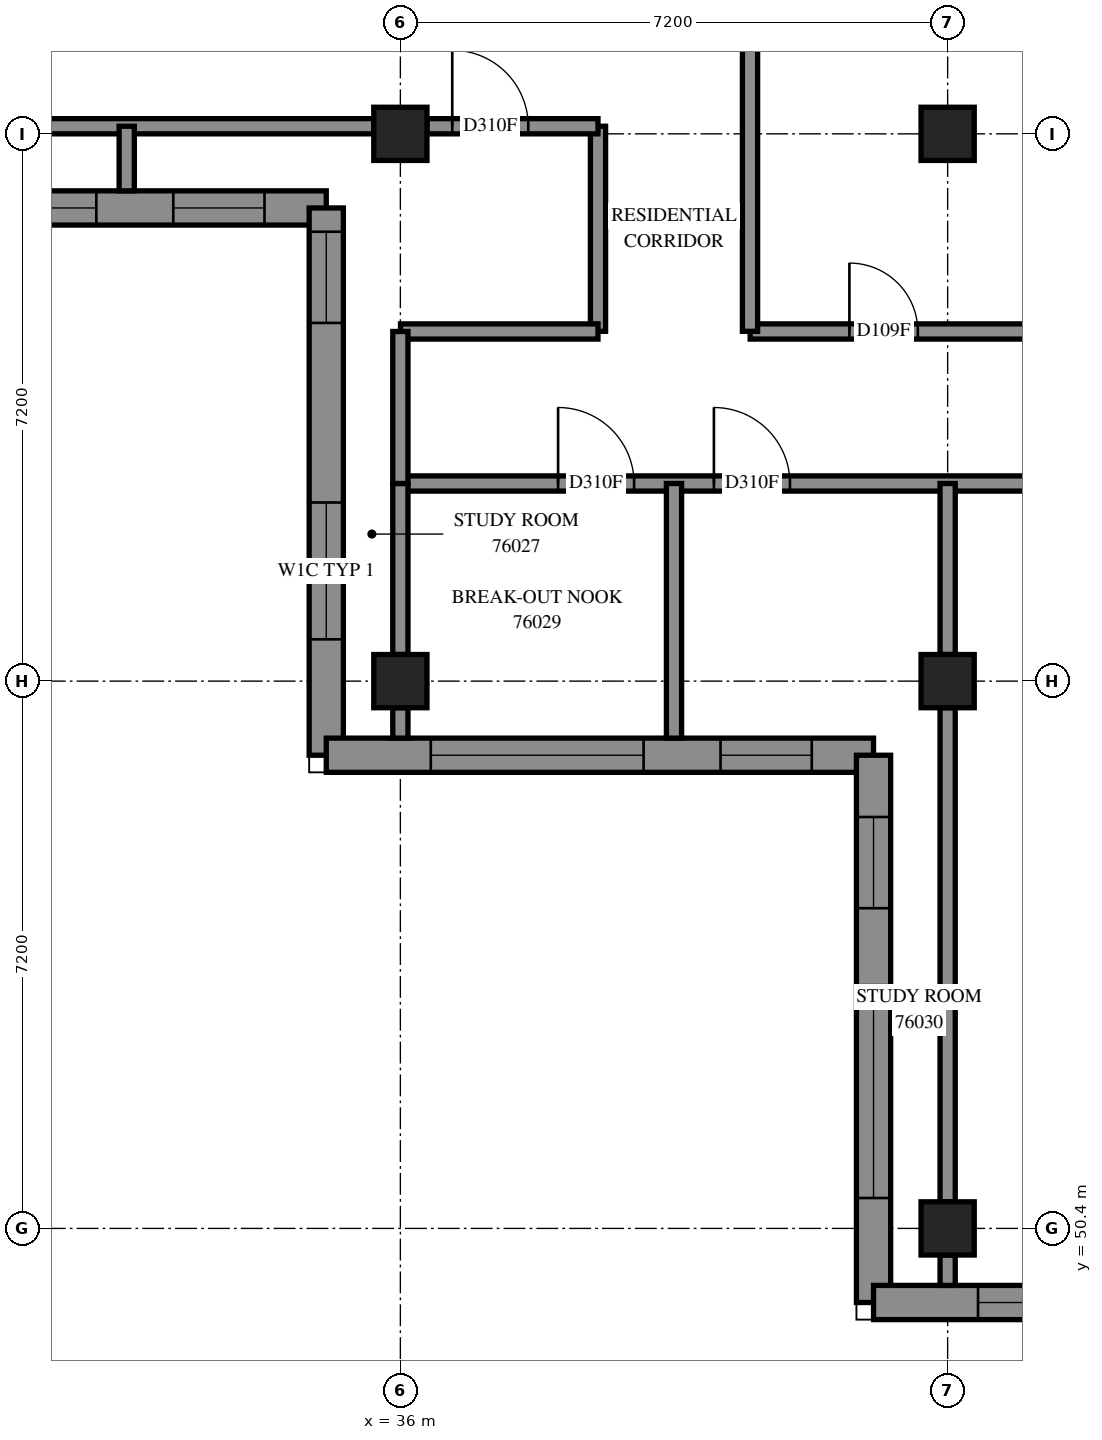
"""IFC4 building model, lengths in metres.
Left out: names, types, materials, properties, quantities, classifications, styles, units other than length and angle.
Written with IfcOpenShell. Run it as: python <this file> out.ifc"""

import sys

from ifc_helpers import new_model, si_unit, direction, frame, frame_2d, origin, origin_2d, place, context, subcontext, project, spatial, polyline, rectangle, outline, extrude, element, fill, save


model = new_model("IFC4")
c1 = context("Model", 3, precision=1e-05, world=origin(), true_north=direction((0.0, 1.0)))
c2 = subcontext(c1, "Body", "Model", "MODEL_VIEW")
j1 = project(units=[si_unit("LENGTHUNIT", "METRE"), si_unit("PLANEANGLEUNIT", "RADIAN")], contexts=[c1])
p1 = place(None, origin())
s1 = spatial("IfcSite", under=j1, at=p1, CompositionType="ELEMENT")
p2 = place(p1, origin())
s2 = spatial("IfcBuilding", under=s1, at=p2, CompositionType="ELEMENT")
p3 = place(p2, frame((0.0, 0.0, 277.8)))
s3 = spatial("IfcBuildingStorey", under=s2, at=p3, CompositionType="ELEMENT", Elevation=277.8)
for number, where, z_axis, x_axis in (
    (1, (36.0, 57.6, 0.0), (0.0, 0.0, 1.0), (1.0, 0.0, 0.0)),
    (2, (36.0, 64.8, 0.0), (0.0, 0.0, 1.0), (1.0, 0.0, 0.0)),
    (3, (43.2, 50.4, 0.0), (0.0, 0.0, 1.0), (1.0, 0.0, 0.0)),
    (4, (43.2, 57.6, 0.0), (0.0, 0.0, 1.0), (1.0, 0.0, 0.0)),
    (5, (43.2, 64.8, 0.0), (0.0, 0.0, 1.0), (1.0, 0.0, 0.0)),
):
    element("IfcColumn", number, at=place(p3, frame(where, z_axis=z_axis, x_axis=x_axis)), inside=s3, PredefinedType="COLUMN", context=c2, shape_type="SweptSolid", body=[
        extrude(rectangle(XDim=0.7, YDim=0.7, at=origin_2d()), origin(), (0.0, 0.0, 1.0), 3.1),
    ])
p4 = place(p3, frame((26.622, 63.825, 0.0), z_axis=(0.0, 0.0, 1.0), x_axis=(1.0, 0.0, 0.0)))
e6 = element("IfcWall", 6, at=p4, inside=s3, PredefinedType="SOLIDWALL", context=c2, shape_type="SweptSolid", body=[
    extrude(outline(polyline([(-0.225, -0.225), (8.178, -0.225), (8.628, 0.225), (0.225, 0.225), (-0.225, -0.225)])), origin(), (0.0, 0.0, 1.0), 3.1),
])
p5 = place(p4, frame((2.578, 0.0, 0.45)))
e7 = element("IfcOpeningElement", 7, at=p5, cuts=e6, PredefinedType="OPENING", context=c2, shape_type="SweptSolid", body=[
    extrude(rectangle(XDim=2.8, YDim=2.55, at=frame_2d((1.4, 1.275))), frame((0.0, 0.235, 0.0), z_axis=(0.0, -1.0, 0.0), x_axis=(1.0, 0.0, 0.0)), (0.0, 0.0, 1.0), 0.47),
])
p6 = place(p4, frame((0.702, 0.0, 0.45)))
e8 = element("IfcOpeningElement", 8, at=p6, cuts=e6, PredefinedType="OPENING", context=c2, shape_type="SweptSolid", body=[
    extrude(rectangle(XDim=1.2, YDim=2.55, at=frame_2d((0.6, 1.275))), frame((0.0, 0.235, 0.0), z_axis=(0.0, -1.0, 0.0), x_axis=(1.0, 0.0, 0.0)), (0.0, 0.0, 1.0), 0.47),
])
p7 = place(p4, frame((6.391, 0.0, 0.45)))
e9 = element("IfcOpeningElement", 9, at=p7, cuts=e6, PredefinedType="OPENING", context=c2, shape_type="SweptSolid", body=[
    extrude(rectangle(XDim=1.2, YDim=2.55, at=frame_2d((0.6, 1.275))), frame((0.0, 0.235, 0.0), z_axis=(0.0, -1.0, 0.0), x_axis=(1.0, 0.0, 0.0)), (0.0, 0.0, 1.0), 0.47),
])
p8 = place(p3, frame((35.025, 63.825, 0.0), z_axis=(0.0, 0.0, 1.0), x_axis=(0.0, -1.0, 0.0)))
e10 = element("IfcWall", 10, at=p8, inside=s3, PredefinedType="SOLIDWALL", context=c2, shape_type="SweptSolid", body=[
    extrude(outline(polyline([(0.225, -0.225), (7.425, -0.225), (6.975, 0.225), (-0.225, 0.225), (0.225, -0.225)])), origin(), (0.0, 0.0, 1.0), 3.1),
])
p9 = place(p8, frame((0.312, 0.0, 0.45)))
e11 = element("IfcOpeningElement", 11, at=p9, cuts=e10, PredefinedType="OPENING", context=c2, shape_type="SweptSolid", body=[
    extrude(rectangle(XDim=1.2, YDim=2.55, at=frame_2d((0.6, 1.275))), frame((0.0, 0.235, 0.0), z_axis=(0.0, -1.0, 0.0), x_axis=(1.0, 0.0, 0.0)), (0.0, 0.0, 1.0), 0.47),
])
p10 = place(p8, frame((3.875, 0.0, 0.7)))
e12 = element("IfcOpeningElement", 12, at=p10, cuts=e10, PredefinedType="OPENING", context=c2, shape_type="SweptSolid", body=[
    extrude(rectangle(XDim=1.8, YDim=2.3, at=frame_2d((0.9, 1.15))), frame((0.0, 0.235, 0.0), z_axis=(0.0, -1.0, 0.0), x_axis=(1.0, 0.0, 0.0)), (0.0, 0.0, 1.0), 0.47),
])
p11 = place(p3, frame((35.025, 56.625, 0.0), z_axis=(0.0, 0.0, 1.0), x_axis=(1.0, 0.0, 0.0)))
e13 = element("IfcWall", 13, at=p11, inside=s3, PredefinedType="SOLIDWALL", context=c2, shape_type="SweptSolid", body=[
    extrude(outline(polyline([(-0.225, -0.225), (6.975, -0.225), (7.425, 0.225), (0.225, 0.225), (-0.225, -0.225)])), origin(), (0.0, 0.0, 1.0), 3.1),
])
p12 = place(p11, frame((1.375, 0.0, 0.45)))
e14 = element("IfcOpeningElement", 14, at=p12, cuts=e13, PredefinedType="OPENING", context=c2, shape_type="SweptSolid", body=[
    extrude(rectangle(XDim=2.8, YDim=2.55, at=frame_2d((1.4, 1.275))), frame((0.0, 0.235, 0.0), z_axis=(0.0, -1.0, 0.0), x_axis=(1.0, 0.0, 0.0)), (0.0, 0.0, 1.0), 0.47),
])
p13 = place(p11, frame((5.188, 0.0, 0.45)))
e15 = element("IfcOpeningElement", 15, at=p13, cuts=e13, PredefinedType="OPENING", context=c2, shape_type="SweptSolid", body=[
    extrude(rectangle(XDim=1.2, YDim=2.55, at=frame_2d((0.6, 1.275))), frame((0.0, 0.235, 0.0), z_axis=(0.0, -1.0, 0.0), x_axis=(1.0, 0.0, 0.0)), (0.0, 0.0, 1.0), 0.47),
])
p14 = place(p3, frame((42.225, 56.625, 0.0), z_axis=(0.0, 0.0, 1.0), x_axis=(0.0, -1.0, 0.0)))
e16 = element("IfcWall", 16, at=p14, inside=s3, PredefinedType="SOLIDWALL", context=c2, shape_type="SweptSolid", body=[
    extrude(outline(polyline([(0.225, -0.225), (7.425, -0.225), (6.975, 0.225), (-0.225, 0.225), (0.225, -0.225)])), origin(), (0.0, 0.0, 1.0), 3.1),
])
p15 = place(p14, frame((3.025, 0.0, 0.45)))
e17 = element("IfcOpeningElement", 17, at=p15, cuts=e16, PredefinedType="OPENING", context=c2, shape_type="SweptSolid", body=[
    extrude(rectangle(XDim=2.8, YDim=2.55, at=frame_2d((1.4, 1.275))), frame((0.0, 0.235, 0.0), z_axis=(0.0, -1.0, 0.0), x_axis=(1.0, 0.0, 0.0)), (0.0, 0.0, 1.0), 0.47),
])
p16 = place(p14, frame((0.812, 0.0, 0.45)))
e18 = element("IfcOpeningElement", 18, at=p16, cuts=e16, PredefinedType="OPENING", context=c2, shape_type="SweptSolid", body=[
    extrude(rectangle(XDim=1.2, YDim=2.55, at=frame_2d((0.6, 1.275))), frame((0.0, 0.235, 0.0), z_axis=(0.0, -1.0, 0.0), x_axis=(1.0, 0.0, 0.0)), (0.0, 0.0, 1.0), 0.47),
])
p17 = place(p3, frame((42.225, 49.425, 0.0), z_axis=(0.0, 0.0, 1.0), x_axis=(1.0, 0.0, 0.0)))
e19 = element("IfcWall", 19, at=p17, inside=s3, PredefinedType="SOLIDWALL", context=c2, shape_type="SweptSolid", body=[
    extrude(outline(polyline([(-0.225, -0.225), (6.975, -0.225), (7.425, 0.225), (0.225, 0.225), (-0.225, -0.225)])), origin(), (0.0, 0.0, 1.0), 3.1),
])
p18 = place(p17, frame((1.375, 0.0, 0.45)))
e20 = element("IfcOpeningElement", 20, at=p18, cuts=e19, PredefinedType="OPENING", context=c2, shape_type="SweptSolid", body=[
    extrude(rectangle(XDim=2.8, YDim=2.55, at=frame_2d((1.4, 1.275))), frame((0.0, 0.235, 0.0), z_axis=(0.0, -1.0, 0.0), x_axis=(1.0, 0.0, 0.0)), (0.0, 0.0, 1.0), 0.47),
])
p19 = place(p17, frame((5.188, 0.0, 0.45)))
e21 = element("IfcOpeningElement", 21, at=p19, cuts=e19, PredefinedType="OPENING", context=c2, shape_type="SweptSolid", body=[
    extrude(rectangle(XDim=1.2, YDim=2.55, at=frame_2d((0.6, 1.275))), frame((0.0, 0.235, 0.0), z_axis=(0.0, -1.0, 0.0), x_axis=(1.0, 0.0, 0.0)), (0.0, 0.0, 1.0), 0.47),
])
p20 = place(p3, frame((36.0, 60.2, 0.0), z_axis=(0.0, 0.0, 1.0), x_axis=(1.0, 0.0, 0.0)))
e22 = element("IfcWall", 22, at=p20, inside=s3, PredefinedType="PARTITIONING", context=c2, shape_type="SweptSolid", body=[
    extrude(rectangle(XDim=17.0, YDim=0.2, at=frame_2d((8.5, 0.0))), origin(), (0.0, 0.0, 1.0), 3.1),
])
p21 = place(p20, frame((15.802, 0.0, 0.0)))
e23 = element("IfcOpeningElement", 23, at=p21, cuts=e22, PredefinedType="OPENING", context=c2, shape_type="SweptSolid", body=[
    extrude(rectangle(XDim=1.0, YDim=2.1, at=frame_2d((0.5, 1.05))), frame((0.0, 0.11, 0.0), z_axis=(0.0, -1.0, 0.0), x_axis=(1.0, 0.0, 0.0)), (0.0, 0.0, 1.0), 0.22),
])
p22 = place(p20, frame((2.075, 0.0, 0.0)))
e24 = element("IfcOpeningElement", 24, at=p22, cuts=e22, PredefinedType="OPENING", context=c2, shape_type="SweptSolid", body=[
    extrude(rectangle(XDim=1.0, YDim=2.1, at=frame_2d((0.5, 1.05))), frame((0.0, 0.11, 0.0), z_axis=(0.0, -1.0, 0.0), x_axis=(1.0, 0.0, 0.0)), (0.0, 0.0, 1.0), 0.22),
])
p23 = place(p20, frame((4.125, 0.0, 0.0)))
e25 = element("IfcOpeningElement", 25, at=p23, cuts=e22, PredefinedType="OPENING", context=c2, shape_type="SweptSolid", body=[
    extrude(rectangle(XDim=1.0, YDim=2.1, at=frame_2d((0.5, 1.05))), frame((0.0, 0.11, 0.0), z_axis=(0.0, -1.0, 0.0), x_axis=(1.0, 0.0, 0.0)), (0.0, 0.0, 1.0), 0.22),
])
p24 = place(p20, frame((9.275, 0.0, 0.0)))
e26 = element("IfcOpeningElement", 26, at=p24, cuts=e22, PredefinedType="OPENING", context=c2, shape_type="SweptSolid", body=[
    extrude(rectangle(XDim=1.0, YDim=2.1, at=frame_2d((0.5, 1.05))), frame((0.0, 0.11, 0.0), z_axis=(0.0, -1.0, 0.0), x_axis=(1.0, 0.0, 0.0)), (0.0, 0.0, 1.0), 0.22),
])
p25 = place(p20, frame((11.48, 0.0, 0.0)))
e27 = element("IfcOpeningElement", 27, at=p25, cuts=e22, PredefinedType="OPENING", context=c2, shape_type="SweptSolid", body=[
    extrude(rectangle(XDim=1.0, YDim=2.1, at=frame_2d((0.5, 1.05))), frame((0.0, 0.11, 0.0), z_axis=(0.0, -1.0, 0.0), x_axis=(1.0, 0.0, 0.0)), (0.0, 0.0, 1.0), 0.22),
])
p26 = place(p3, frame((40.602, 62.2, 0.0), z_axis=(0.0, 0.0, 1.0), x_axis=(1.0, 0.0, 0.0)))
e28 = element("IfcWall", 28, at=p26, inside=s3, PredefinedType="PARTITIONING", context=c2, shape_type="SweptSolid", body=[
    extrude(rectangle(XDim=9.798, YDim=0.2, at=frame_2d((4.899, 0.0))), origin(), (0.0, 0.0, 1.0), 3.1),
])
p27 = place(p26, frame((1.306, 0.0, 0.0)))
e29 = element("IfcOpeningElement", 29, at=p27, cuts=e28, PredefinedType="OPENING", context=c2, shape_type="SweptSolid", body=[
    extrude(rectangle(XDim=0.9, YDim=2.1, at=frame_2d((0.45, 1.05))), frame((0.0, 0.11, 0.0), z_axis=(0.0, -1.0, 0.0), x_axis=(1.0, 0.0, 0.0)), (0.0, 0.0, 1.0), 0.22),
])
p28 = place(p26, frame((6.711, 0.0, 0.0)))
e30 = element("IfcOpeningElement", 30, at=p28, cuts=e28, PredefinedType="OPENING", context=c2, shape_type="SweptSolid", body=[
    extrude(rectangle(XDim=1.0, YDim=2.1, at=frame_2d((0.5, 1.05))), frame((0.0, 0.11, 0.0), z_axis=(0.0, -1.0, 0.0), x_axis=(1.0, 0.0, 0.0)), (0.0, 0.0, 1.0), 0.22),
])
for number, where, z_axis, x_axis in (
    (31, (29.15, 64.9, 0.0), (0.0, 0.0, 1.0), (1.0, 0.0, 0.0)),
    (32, (43.2, 50.75, 0.0), (0.0, 0.0, 1.0), (0.0, 1.0, 0.0)),
):
    element("IfcWall", number, at=place(p3, frame(where, z_axis=z_axis, x_axis=x_axis)), inside=s3, PredefinedType="PARTITIONING", context=c2, shape_type="SweptSolid", body=[
        extrude(rectangle(XDim=6.5, YDim=0.2, at=frame_2d((3.25, 0.0))), origin(), (0.0, 0.0, 1.0), 2.6),
    ])
p29 = place(p3, frame((40.6, 62.202, 0.0), z_axis=(0.0, 0.0, 1.0), x_axis=(0.0, 1.0, 0.0)))
e33 = element("IfcWall", 33, at=p29, inside=s3, PredefinedType="PARTITIONING", context=c2, shape_type="SweptSolid", body=[
    extrude(rectangle(XDim=4.696, YDim=0.2, at=frame_2d((2.348, 0.0))), origin(), (0.0, 0.0, 1.0), 3.1),
])
p30 = place(p3, frame((39.6, 56.85, 0.0), z_axis=(0.0, 0.0, 1.0), x_axis=(0.0, 1.0, 0.0)))
e34 = element("IfcWall", 34, at=p30, inside=s3, PredefinedType="PARTITIONING", context=c2, shape_type="SweptSolid", body=[
    extrude(rectangle(XDim=3.35, YDim=0.2, at=frame_2d((1.675, 0.0))), origin(), (0.0, 0.0, 1.0), 3.1),
])
p31 = place(p3, frame((38.6, 62.202, 0.0), z_axis=(0.0, 0.0, 1.0), x_axis=(0.0, 1.0, 0.0)))
e35 = element("IfcWall", 35, at=p31, inside=s3, PredefinedType="PARTITIONING", context=c2, shape_type="SweptSolid", body=[
    extrude(rectangle(XDim=2.698, YDim=0.2, at=frame_2d((1.349, 0.0))), origin(), (0.0, 0.0, 1.0), 3.1),
])
p32 = place(p3, frame((36.002, 62.2, 0.0), z_axis=(0.0, 0.0, 1.0), x_axis=(1.0, 0.0, 0.0)))
e36 = element("IfcWall", 36, at=p32, inside=s3, PredefinedType="PARTITIONING", context=c2, shape_type="SweptSolid", body=[
    extrude(rectangle(XDim=2.598, YDim=0.2, at=frame_2d((1.299, 0.0))), origin(), (0.0, 0.0, 1.0), 3.1),
])
p33 = place(p3, frame((36.35, 64.9, 0.0), z_axis=(0.0, 0.0, 1.0), x_axis=(1.0, 0.0, 0.0)))
e37 = element("IfcWall", 37, at=p33, inside=s3, PredefinedType="PARTITIONING", context=c2, shape_type="SweptSolid", body=[
    extrude(rectangle(XDim=2.25, YDim=0.2, at=frame_2d((1.125, 0.0))), origin(), (0.0, 0.0, 1.0), 3.1),
])
p34 = place(p33, frame((0.333, 0.0, 0.0)))
e38 = element("IfcOpeningElement", 38, at=p34, cuts=e37, PredefinedType="OPENING", context=c2, shape_type="SweptSolid", body=[
    extrude(rectangle(XDim=1.0, YDim=2.1, at=frame_2d((0.5, 1.05))), frame((0.0, 0.11, 0.0), z_axis=(0.0, -1.0, 0.0), x_axis=(1.0, 0.0, 0.0)), (0.0, 0.0, 1.0), 0.22),
])
p35 = place(p3, frame((36.0, 57.95, 0.0), z_axis=(0.0, 0.0, 1.0), x_axis=(0.0, 1.0, 0.0)))
e39 = element("IfcWall", 39, at=p35, inside=s3, PredefinedType="PARTITIONING", context=c2, shape_type="SweptSolid", body=[
    extrude(rectangle(XDim=2.25, YDim=0.2, at=frame_2d((1.125, 0.0))), origin(), (0.0, 0.0, 1.0), 2.6),
])
p36 = place(p3, frame((43.2, 57.95, 0.0), z_axis=(0.0, 0.0, 1.0), x_axis=(0.0, 1.0, 0.0)))
e40 = element("IfcWall", 40, at=p36, inside=s3, PredefinedType="PARTITIONING", context=c2, shape_type="SweptSolid", body=[
    extrude(rectangle(XDim=2.25, YDim=0.2, at=frame_2d((1.125, 0.0))), origin(), (0.0, 0.0, 1.0), 3.1),
])
p37 = place(p3, frame((36.0, 60.2, 0.0), z_axis=(0.0, 0.0, 1.0), x_axis=(0.0, 1.0, 0.0)))
e41 = element("IfcWall", 41, at=p37, inside=s3, PredefinedType="PARTITIONING", context=c2, shape_type="SweptSolid", body=[
    extrude(rectangle(XDim=2.0, YDim=0.2, at=frame_2d((1.0, 0.0))), origin(), (0.0, 0.0, 1.0), 2.6),
])
p38 = place(p3, frame((32.4, 64.05, 0.0), z_axis=(0.0, 0.0, 1.0), x_axis=(0.0, 1.0, 0.0)))
e42 = element("IfcWall", 42, at=p38, inside=s3, PredefinedType="PARTITIONING", context=c2, shape_type="SweptSolid", body=[
    extrude(rectangle(XDim=0.85, YDim=0.2, at=frame_2d((0.425, 0.0))), origin(), (0.0, 0.0, 1.0), 3.1),
])
for number, where, z_axis, x_axis in (
    (43, (36.0, 56.85, 0.0), (0.0, 0.0, 1.0), (0.0, 1.0, 0.0)),
    (44, (43.2, 49.65, 0.0), (0.0, 0.0, 1.0), (0.0, 1.0, 0.0)),
):
    element("IfcWall", number, at=place(p3, frame(where, z_axis=z_axis, x_axis=x_axis)), inside=s3, PredefinedType="PARTITIONING", context=c2, shape_type="SweptSolid", body=[
        extrude(rectangle(XDim=0.4, YDim=0.2, at=frame_2d((0.2, 0.0))), origin(), (0.0, 0.0, 1.0), 3.1),
    ])
p39 = place(p5, origin())
e45 = element("IfcWindow", 45, at=p39, inside=s3, PartitioningType="SINGLE_PANEL", PredefinedType="WINDOW", context=c2, shape_type="SweptSolid", body=[
    extrude(rectangle(XDim=2.8, YDim=2.55, at=frame_2d((1.4, 1.275))), frame((0.0, 0.205, 0.0), z_axis=(0.0, -1.0, 0.0), x_axis=(1.0, 0.0, 0.0)), (0.0, 0.0, 1.0), 0.06),
])
fill(e7, e45)
p40 = place(p7, origin())
e46 = element("IfcWindow", 46, at=p40, inside=s3, PartitioningType="SINGLE_PANEL", PredefinedType="WINDOW", context=c2, shape_type="SweptSolid", body=[
    extrude(rectangle(XDim=1.2, YDim=2.55, at=frame_2d((0.6, 1.275))), frame((0.0, 0.205, 0.0), z_axis=(0.0, -1.0, 0.0), x_axis=(1.0, 0.0, 0.0)), (0.0, 0.0, 1.0), 0.06),
])
fill(e9, e46)
p41 = place(p9, origin())
e47 = element("IfcWindow", 47, at=p41, inside=s3, PartitioningType="SINGLE_PANEL", PredefinedType="WINDOW", context=c2, shape_type="SweptSolid", body=[
    extrude(rectangle(XDim=1.2, YDim=2.55, at=frame_2d((0.6, 1.275))), frame((0.0, 0.205, 0.0), z_axis=(0.0, -1.0, 0.0), x_axis=(1.0, 0.0, 0.0)), (0.0, 0.0, 1.0), 0.06),
])
fill(e11, e47)
p42 = place(p12, origin())
e48 = element("IfcWindow", 48, at=p42, inside=s3, PartitioningType="SINGLE_PANEL", PredefinedType="WINDOW", context=c2, shape_type="SweptSolid", body=[
    extrude(rectangle(XDim=2.8, YDim=2.55, at=frame_2d((1.4, 1.275))), frame((0.0, 0.205, 0.0), z_axis=(0.0, -1.0, 0.0), x_axis=(1.0, 0.0, 0.0)), (0.0, 0.0, 1.0), 0.06),
])
fill(e14, e48)
p43 = place(p13, origin())
e49 = element("IfcWindow", 49, at=p43, inside=s3, PartitioningType="SINGLE_PANEL", PredefinedType="WINDOW", context=c2, shape_type="SweptSolid", body=[
    extrude(rectangle(XDim=1.2, YDim=2.55, at=frame_2d((0.6, 1.275))), frame((0.0, 0.205, 0.0), z_axis=(0.0, -1.0, 0.0), x_axis=(1.0, 0.0, 0.0)), (0.0, 0.0, 1.0), 0.06),
])
fill(e15, e49)
p44 = place(p15, origin())
e50 = element("IfcWindow", 50, at=p44, inside=s3, PartitioningType="SINGLE_PANEL", PredefinedType="WINDOW", context=c2, shape_type="SweptSolid", body=[
    extrude(rectangle(XDim=2.8, YDim=2.55, at=frame_2d((1.4, 1.275))), frame((0.0, 0.205, 0.0), z_axis=(0.0, -1.0, 0.0), x_axis=(1.0, 0.0, 0.0)), (0.0, 0.0, 1.0), 0.06),
])
fill(e17, e50)
p45 = place(p16, origin())
e51 = element("IfcWindow", 51, at=p45, inside=s3, PartitioningType="SINGLE_PANEL", PredefinedType="WINDOW", context=c2, shape_type="SweptSolid", body=[
    extrude(rectangle(XDim=1.2, YDim=2.55, at=frame_2d((0.6, 1.275))), frame((0.0, 0.205, 0.0), z_axis=(0.0, -1.0, 0.0), x_axis=(1.0, 0.0, 0.0)), (0.0, 0.0, 1.0), 0.06),
])
fill(e18, e51)
p46 = place(p18, origin())
e52 = element("IfcWindow", 52, at=p46, inside=s3, PartitioningType="SINGLE_PANEL", PredefinedType="WINDOW", context=c2, shape_type="SweptSolid", body=[
    extrude(rectangle(XDim=2.8, YDim=2.55, at=frame_2d((1.4, 1.275))), frame((0.0, 0.205, 0.0), z_axis=(0.0, -1.0, 0.0), x_axis=(1.0, 0.0, 0.0)), (0.0, 0.0, 1.0), 0.06),
])
fill(e20, e52)
p47 = place(p34, origin())
e53 = element("IfcDoor", 53, at=p47, inside=s3, OperationType="SINGLE_SWING_RIGHT", PredefinedType="DOOR", context=c2, shape_type="SweptSolid", body=[
    extrude(rectangle(XDim=1.0, YDim=2.1, at=frame_2d((0.5, 1.05))), frame((0.0, 0.025, 0.0), z_axis=(0.0, -1.0, 0.0), x_axis=(1.0, 0.0, 0.0)), (0.0, 0.0, 1.0), 0.05),
])
fill(e38, e53)
p48 = place(p22, origin())
e54 = element("IfcDoor", 54, at=p48, inside=s3, OperationType="SINGLE_SWING_LEFT", PredefinedType="DOOR", context=c2, shape_type="SweptSolid", body=[
    extrude(rectangle(XDim=1.0, YDim=2.1, at=frame_2d((0.5, 1.05))), frame((0.0, 0.025, 0.0), z_axis=(0.0, -1.0, 0.0), x_axis=(1.0, 0.0, 0.0)), (0.0, 0.0, 1.0), 0.05),
])
fill(e24, e54)
p49 = place(p23, origin())
e55 = element("IfcDoor", 55, at=p49, inside=s3, OperationType="SINGLE_SWING_RIGHT", PredefinedType="DOOR", context=c2, shape_type="SweptSolid", body=[
    extrude(rectangle(XDim=1.0, YDim=2.1, at=frame_2d((0.5, 1.05))), frame((0.0, 0.025, 0.0), z_axis=(0.0, -1.0, 0.0), x_axis=(1.0, 0.0, 0.0)), (0.0, 0.0, 1.0), 0.05),
])
fill(e25, e55)
p50 = place(p27, origin())
e56 = element("IfcDoor", 56, at=p50, inside=s3, OperationType="SINGLE_SWING_LEFT", PredefinedType="DOOR", context=c2, shape_type="SweptSolid", body=[
    extrude(rectangle(XDim=0.9, YDim=2.1, at=frame_2d((0.45, 1.05))), frame((0.0, 0.025, 0.0), z_axis=(0.0, -1.0, 0.0), x_axis=(1.0, 0.0, 0.0)), (0.0, 0.0, 1.0), 0.05),
])
fill(e29, e56)
p51 = place(p10, origin())
e57 = element("IfcWindow", 57, at=p51, inside=s3, PartitioningType="SINGLE_PANEL", PredefinedType="WINDOW", context=c2, shape_type="SweptSolid", body=[
    extrude(rectangle(XDim=1.8, YDim=2.3, at=frame_2d((0.9, 1.15))), frame((0.0, 0.205, 0.0), z_axis=(0.0, -1.0, 0.0), x_axis=(1.0, 0.0, 0.0)), (0.0, 0.0, 1.0), 0.06),
])
fill(e12, e57)
save(model, sys.argv[1])
